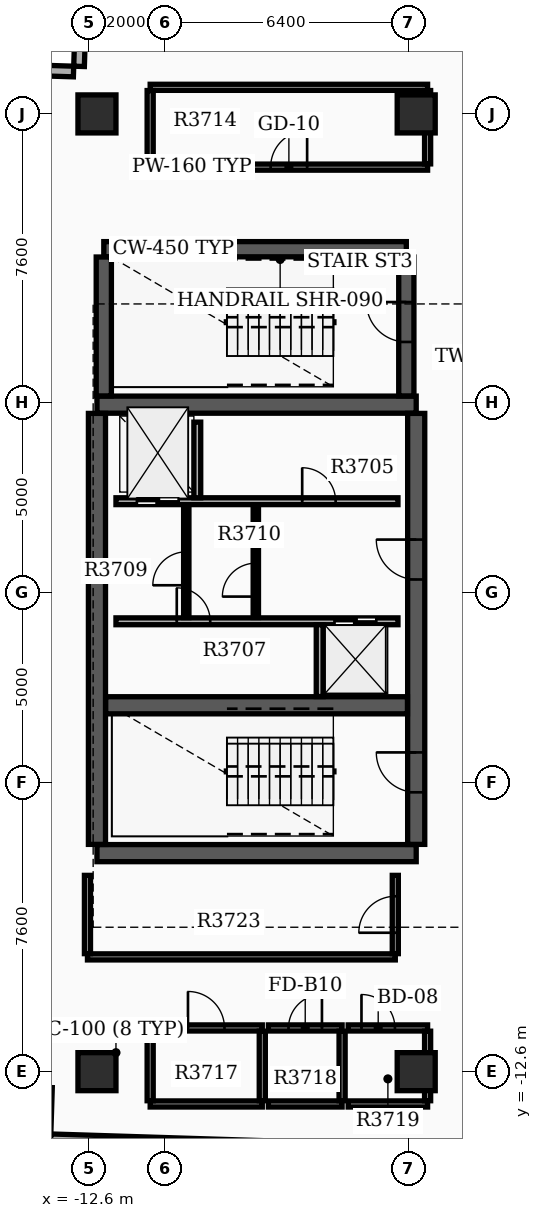
"""IFC4 building model, lengths in metres.
Left out: names, types, materials, properties, quantities, classifications, styles, units other than length and angle.
Written with IfcOpenShell. Run it as: python <this file> out.ifc"""

import sys

from ifc_helpers import new_model, si_unit, direction, frame, frame_2d, origin, origin_2d, place, context, subcontext, project, spatial, rectangle, extrude, element, fill, save


model = new_model("IFC4")
c1 = context("Model", 3, precision=1e-05, world=origin(), true_north=direction((0.0, 1.0)))
c2 = subcontext(c1, "Body", "Model", "MODEL_VIEW")
j1 = project(units=[si_unit("LENGTHUNIT", "METRE"), si_unit("PLANEANGLEUNIT", "RADIAN")], contexts=[c1])
p1 = place(None, origin())
s1 = spatial("IfcSite", under=j1, at=p1, CompositionType="ELEMENT")
p2 = place(p1, origin())
s2 = spatial("IfcBuilding", under=s1, at=p2, CompositionType="ELEMENT")
p3 = place(p2, frame((0.0, 0.0, 232.5)))
s3 = spatial("IfcBuildingStorey", under=s2, at=p3, CompositionType="ELEMENT", Elevation=232.5)
for number, where, z_axis, x_axis in (
    (1, (-12.4, -6.85, 0.0), (0.0, 0.0, 1.0), (1.0, 0.0, 0.0)),
    (2, (-12.4, 4.95, 0.0), (0.0, 0.0, 1.0), (1.0, 0.0, 0.0)),
):
    element("IfcWall", number, at=place(p3, frame(where, z_axis=z_axis, x_axis=x_axis)), inside=s3, PredefinedType="SHEAR", context=c2, shape_type="SweptSolid", body=[
        extrude(rectangle(XDim=8.4, YDim=0.45, at=frame_2d((4.2, 0.0))), origin(), (0.0, 0.0, 1.0), 3.7),
    ])
p4 = place(p3, frame((-12.4, -6.62, 0.0), z_axis=(0.0, 0.0, 1.0), x_axis=(0.0, 1.0, 0.0)))
e3 = element("IfcWall", 3, at=p4, inside=s3, PredefinedType="SHEAR", context=c2, shape_type="SweptSolid", body=[
    extrude(rectangle(XDim=11.34, YDim=0.45, at=frame_2d((5.67, 0.0))), origin(), (0.0, 0.0, 1.0), 3.7),
])
p5 = place(p3, frame((-4.0, -6.62, 0.0), z_axis=(0.0, 0.0, 1.0), x_axis=(0.0, 1.0, 0.0)))
e4 = element("IfcWall", 4, at=p5, inside=s3, PredefinedType="SHEAR", context=c2, shape_type="SweptSolid", body=[
    extrude(rectangle(XDim=11.34, YDim=0.45, at=frame_2d((5.67, 0.0))), origin(), (0.0, 0.0, 1.0), 3.7),
])
p6 = place(p5, frame((1.37, 0.0, 0.0)))
e5 = element("IfcOpeningElement", 5, at=p6, cuts=e4, PredefinedType="OPENING", context=c2, shape_type="SweptSolid", body=[
    extrude(rectangle(XDim=1.05, YDim=2.15, at=frame_2d((0.525, 1.075))), frame((0.0, 0.235, 0.0), z_axis=(0.0, -1.0, 0.0), x_axis=(1.0, 0.0, 0.0)), (0.0, 0.0, 1.0), 0.47),
])
p7 = place(p5, frame((6.97, 0.0, 0.0)))
e6 = element("IfcOpeningElement", 6, at=p7, cuts=e4, PredefinedType="OPENING", context=c2, shape_type="SweptSolid", body=[
    extrude(rectangle(XDim=1.05, YDim=2.15, at=frame_2d((0.525, 1.075))), frame((0.0, 0.235, 0.0), z_axis=(0.0, -1.0, 0.0), x_axis=(1.0, 0.0, 0.0)), (0.0, 0.0, 1.0), 0.47),
])
p8 = place(p3, frame((-12.17, -2.96, 0.0), z_axis=(0.0, 0.0, 1.0), x_axis=(1.0, 0.0, 0.0)))
e7 = element("IfcWall", 7, at=p8, inside=s3, PredefinedType="SHEAR", context=c2, shape_type="SweptSolid", body=[
    extrude(rectangle(XDim=7.94, YDim=0.45, at=frame_2d((3.97, 0.0))), origin(), (0.0, 0.0, 1.0), 3.7),
])
p9 = place(p3, frame((-12.22, 9.04, 0.0), z_axis=(0.0, 0.0, 1.0), x_axis=(1.0, 0.0, 0.0)))
e8 = element("IfcWall", 8, at=p9, inside=s3, PredefinedType="SHEAR", context=c2, shape_type="SweptSolid", body=[
    extrude(rectangle(XDim=7.96, YDim=0.4, at=frame_2d((3.98, 0.0))), origin(), (0.0, 0.0, 1.0), 3.7),
])
p10 = place(p3, frame((-12.22, 5.18, 0.0), z_axis=(0.0, 0.0, 1.0), x_axis=(0.0, 1.0, 0.0)))
e9 = element("IfcWall", 9, at=p10, inside=s3, PredefinedType="SHEAR", context=c2, shape_type="SweptSolid", body=[
    extrude(rectangle(XDim=3.655, YDim=0.4, at=frame_2d((1.828, 0.0))), origin(), (0.0, 0.0, 1.0), 3.7),
])
p11 = place(p3, frame((-4.26, 5.18, 0.0), z_axis=(0.0, 0.0, 1.0), x_axis=(0.0, 1.0, 0.0)))
e10 = element("IfcWall", 10, at=p11, inside=s3, PredefinedType="SHEAR", context=c2, shape_type="SweptSolid", body=[
    extrude(rectangle(XDim=3.655, YDim=0.4, at=frame_2d((1.828, 0.0))), origin(), (0.0, 0.0, 1.0), 3.7),
])
p12 = place(p11, frame((1.42, 0.0, 0.0)))
e11 = element("IfcOpeningElement", 11, at=p12, cuts=e10, PredefinedType="OPENING", context=c2, shape_type="SweptSolid", body=[
    extrude(rectangle(XDim=1.05, YDim=2.15, at=frame_2d((0.525, 1.075))), frame((0.0, 0.21, 0.0), z_axis=(0.0, -1.0, 0.0), x_axis=(1.0, 0.0, 0.0)), (0.0, 0.0, 1.0), 0.42),
])
for number, where, z_axis, x_axis in (
    (12, (-12.4, -12.6, 0.0), (0.0, 0.0, 1.0), (1.0, 0.0, 0.0)),
    (13, (-12.4, 12.6, 0.0), (0.0, 0.0, 1.0), (1.0, 0.0, 0.0)),
    (14, (-4.0, -12.6, 0.0), (0.0, 0.0, 1.0), (1.0, 0.0, 0.0)),
    (15, (-4.0, 12.6, 0.0), (0.0, 0.0, 1.0), (1.0, 0.0, 0.0)),
):
    element("IfcColumn", number, at=place(p3, frame(where, z_axis=z_axis, x_axis=x_axis)), inside=s3, PredefinedType="COLUMN", context=c2, shape_type="SweptSolid", body=[
        extrude(rectangle(XDim=1.0, YDim=1.0, at=origin_2d()), origin(), (0.0, 0.0, 1.0), 3.9),
    ])
p13 = place(p3, frame((-14.235, 13.754, 0.0), z_axis=(0.0, 0.0, 1.0), x_axis=(0.999506398264, -0.031415916822, 0.0)))
e16 = element("IfcWall", 16, at=p13, inside=s3, PredefinedType="STANDARD", context=c2, shape_type="SweptSolid", body=[
    extrude(rectangle(XDim=1.22, YDim=0.28, at=frame_2d((0.61, 0.0))), origin(), (0.0, 0.0, 1.0), 3.18),
])
p14 = place(p3, frame((-12.871, 13.851, 0.0), z_axis=(0.0, 0.0, 1.0), x_axis=(0.031412596484, 0.999506502621, 0.0)))
e17 = element("IfcWall", 17, at=p14, inside=s3, PredefinedType="STANDARD", context=c2, shape_type="SweptSolid", body=[
    extrude(rectangle(XDim=1.5, YDim=0.28, at=frame_2d((0.75, 0.0))), origin(), (0.0, 0.0, 1.0), 3.18),
])
p15 = place(p3, frame((-13.618, -14.379, 0.0), z_axis=(0.0, 0.0, 1.0), x_axis=(0.999507224741, -0.031389611199, 0.0)))
e18 = element("IfcWall", 18, at=p15, inside=s3, PredefinedType="STANDARD", context=c2, shape_type="SweptSolid", body=[
    extrude(rectangle(XDim=6.3, YDim=0.28, at=frame_2d((3.15, 0.0))), origin(), (0.0, 0.0, 1.0), 3.18),
])
p16 = place(p3, frame((-11.9, 2.41, 0.0), z_axis=(0.0, 0.0, 1.0), x_axis=(1.0, 0.0, 0.0)))
e19 = element("IfcWall", 19, at=p16, inside=s3, PredefinedType="SOLIDWALL", context=c2, shape_type="SweptSolid", body=[
    extrude(rectangle(XDim=7.42, YDim=0.18, at=frame_2d((3.71, 0.0))), origin(), (0.0, 0.0, 1.0), 3.17),
])
p17 = place(p16, frame((0.55, 0.0, 0.0)))
e20 = element("IfcOpeningElement", 20, at=p17, cuts=e19, PredefinedType="OPENING", context=c2, shape_type="SweptSolid", body=[
    extrude(rectangle(XDim=1.1, YDim=2.15, at=frame_2d((0.55, 1.075))), frame((0.0, 0.1, 0.0), z_axis=(0.0, -1.0, 0.0), x_axis=(1.0, 0.0, 0.0)), (0.0, 0.0, 1.0), 0.2),
])
p18 = place(p16, frame((4.9, 0.0, 0.0)))
e21 = element("IfcOpeningElement", 21, at=p18, cuts=e19, PredefinedType="OPENING", context=c2, shape_type="SweptSolid", body=[
    extrude(rectangle(XDim=0.88, YDim=2.1, at=frame_2d((0.44, 1.05))), frame((0.0, 0.1, 0.0), z_axis=(0.0, -1.0, 0.0), x_axis=(1.0, 0.0, 0.0)), (0.0, 0.0, 1.0), 0.2),
])
p19 = place(p3, frame((-11.9, -0.75, 0.0), z_axis=(0.0, 0.0, 1.0), x_axis=(1.0, 0.0, 0.0)))
e22 = element("IfcWall", 22, at=p19, inside=s3, PredefinedType="SOLIDWALL", context=c2, shape_type="SweptSolid", body=[
    extrude(rectangle(XDim=7.42, YDim=0.18, at=frame_2d((3.71, 0.0))), origin(), (0.0, 0.0, 1.0), 3.17),
])
p20 = place(p19, frame((5.75, 0.0, 0.0)))
e23 = element("IfcOpeningElement", 23, at=p20, cuts=e22, PredefinedType="OPENING", context=c2, shape_type="SweptSolid", body=[
    extrude(rectangle(XDim=1.1, YDim=2.15, at=frame_2d((0.55, 1.075))), frame((0.0, 0.1, 0.0), z_axis=(0.0, -1.0, 0.0), x_axis=(1.0, 0.0, 0.0)), (0.0, 0.0, 1.0), 0.2),
])
p21 = place(p19, frame((1.6, 0.0, 0.0)))
e24 = element("IfcOpeningElement", 24, at=p21, cuts=e22, PredefinedType="OPENING", context=c2, shape_type="SweptSolid", body=[
    extrude(rectangle(XDim=0.88, YDim=2.1, at=frame_2d((0.44, 1.05))), frame((0.0, 0.1, 0.0), z_axis=(0.0, -1.0, 0.0), x_axis=(1.0, 0.0, 0.0)), (0.0, 0.0, 1.0), 0.2),
])
p22 = place(p3, frame((-9.76, 2.5, 0.0), z_axis=(0.0, 0.0, 1.0), x_axis=(0.0, 1.0, 0.0)))
e25 = element("IfcWall", 25, at=p22, inside=s3, PredefinedType="SOLIDWALL", context=c2, shape_type="SweptSolid", body=[
    extrude(rectangle(XDim=1.99, YDim=0.18, at=frame_2d((0.995, 0.0))), origin(), (0.0, 0.0, 1.0), 3.17),
])
p23 = place(p3, frame((-6.54, -2.73, 0.0), z_axis=(0.0, 0.0, 1.0), x_axis=(0.0, 1.0, 0.0)))
e26 = element("IfcWall", 26, at=p23, inside=s3, PredefinedType="SOLIDWALL", context=c2, shape_type="SweptSolid", body=[
    extrude(rectangle(XDim=1.89, YDim=0.18, at=frame_2d((0.945, 0.0))), origin(), (0.0, 0.0, 1.0), 3.17),
])
p24 = place(p3, frame((-8.22, -0.65, 0.0), z_axis=(0.0, 0.0, 1.0), x_axis=(0.0, 1.0, 0.0)))
e27 = element("IfcWall", 27, at=p24, inside=s3, PredefinedType="SOLIDWALL", context=c2, shape_type="SweptSolid", body=[
    extrude(rectangle(XDim=2.96, YDim=0.14, at=frame_2d((1.48, 0.0))), origin(), (0.0, 0.0, 1.0), 3.17),
])
p25 = place(p24, frame((0.55, 0.0, 0.0)))
e28 = element("IfcOpeningElement", 28, at=p25, cuts=e27, PredefinedType="OPENING", context=c2, shape_type="SweptSolid", body=[
    extrude(rectangle(XDim=0.88, YDim=2.1, at=frame_2d((0.44, 1.05))), frame((0.0, 0.08, 0.0), z_axis=(0.0, -1.0, 0.0), x_axis=(1.0, 0.0, 0.0)), (0.0, 0.0, 1.0), 0.16),
])
p26 = place(p3, frame((-10.05, -0.652, 0.0), z_axis=(0.0, 0.0, 1.0), x_axis=(0.0, 1.0, 0.0)))
e29 = element("IfcWall", 29, at=p26, inside=s3, PredefinedType="PARTITIONING", context=c2, shape_type="SweptSolid", body=[
    extrude(rectangle(XDim=2.962, YDim=0.14, at=frame_2d((1.481, 0.0))), origin(), (0.0, 0.0, 1.0), 3.17),
])
p27 = place(p26, frame((0.85, 0.0, 0.0)))
e30 = element("IfcOpeningElement", 30, at=p27, cuts=e29, PredefinedType="OPENING", context=c2, shape_type="SweptSolid", body=[
    extrude(rectangle(XDim=0.88, YDim=2.1, at=frame_2d((0.44, 1.05))), frame((0.0, 0.08, 0.0), z_axis=(0.0, -1.0, 0.0), x_axis=(1.0, 0.0, 0.0)), (0.0, 0.0, 1.0), 0.16),
])
p28 = place(p3, frame((-11.0, 11.2, 0.0), z_axis=(0.0, 0.0, 1.0), x_axis=(1.0, 0.0, 0.0)))
e31 = element("IfcWall", 31, at=p28, inside=s3, PredefinedType="PARTITIONING", context=c2, shape_type="SweptSolid", body=[
    extrude(rectangle(XDim=7.3, YDim=0.16, at=frame_2d((3.65, 0.0))), origin(), (0.0, 0.0, 1.0), 3.17),
])
p29 = place(p28, frame((3.17, 0.0, 0.0)))
e32 = element("IfcOpeningElement", 32, at=p29, cuts=e31, PredefinedType="OPENING", context=c2, shape_type="SweptSolid", body=[
    extrude(rectangle(XDim=0.96, YDim=2.15, at=frame_2d((0.48, 1.075))), frame((0.0, 0.09, 0.0), z_axis=(0.0, -1.0, 0.0), x_axis=(1.0, 0.0, 0.0)), (0.0, 0.0, 1.0), 0.18),
])
p30 = place(p3, frame((-11.0, 13.3, 0.0), z_axis=(0.0, 0.0, 1.0), x_axis=(1.0, 0.0, 0.0)))
e33 = element("IfcWall", 33, at=p30, inside=s3, PredefinedType="PARTITIONING", context=c2, shape_type="SweptSolid", body=[
    extrude(rectangle(XDim=7.3, YDim=0.16, at=frame_2d((3.65, 0.0))), origin(), (0.0, 0.0, 1.0), 3.17),
])
for number, where, z_axis, x_axis in (
    (34, (-11.0, 11.285, 0.0), (0.0, 0.0, 1.0), (0.0, 1.0, 0.0)),
    (35, (-3.7, 11.285, 0.0), (0.0, 0.0, 1.0), (0.0, 1.0, 0.0)),
):
    element("IfcWall", number, at=place(p3, frame(where, z_axis=z_axis, x_axis=x_axis)), inside=s3, PredefinedType="PARTITIONING", context=c2, shape_type="SweptSolid", body=[
        extrude(rectangle(XDim=1.93, YDim=0.16, at=frame_2d((0.965, 0.0))), origin(), (0.0, 0.0, 1.0), 3.17),
    ])
p31 = place(p3, frame((-11.0, -13.45, 0.0), z_axis=(0.0, 0.0, 1.0), x_axis=(1.0, 0.0, 0.0)))
e36 = element("IfcWall", 36, at=p31, inside=s3, PredefinedType="PARTITIONING", context=c2, shape_type="SweptSolid", body=[
    extrude(rectangle(XDim=2.95, YDim=0.16, at=frame_2d((1.475, 0.0))), origin(), (0.0, 0.0, 1.0), 3.17),
])
p32 = place(p3, frame((-11.0, -11.45, 0.0), z_axis=(0.0, 0.0, 1.0), x_axis=(1.0, 0.0, 0.0)))
e37 = element("IfcWall", 37, at=p32, inside=s3, PredefinedType="PARTITIONING", context=c2, shape_type="SweptSolid", body=[
    extrude(rectangle(XDim=2.95, YDim=0.16, at=frame_2d((1.475, 0.0))), origin(), (0.0, 0.0, 1.0), 3.17),
])
p33 = place(p32, frame((0.995, 0.0, 0.0)))
e38 = element("IfcOpeningElement", 38, at=p33, cuts=e37, PredefinedType="OPENING", context=c2, shape_type="SweptSolid", body=[
    extrude(rectangle(XDim=0.96, YDim=2.15, at=frame_2d((0.48, 1.075))), frame((0.0, 0.09, 0.0), z_axis=(0.0, -1.0, 0.0), x_axis=(1.0, 0.0, 0.0)), (0.0, 0.0, 1.0), 0.18),
])
for number, where, z_axis, x_axis in (
    (39, (-11.0, -13.365, 0.0), (0.0, 0.0, 1.0), (0.0, 1.0, 0.0)),
    (40, (-8.05, -13.365, 0.0), (0.0, 0.0, 1.0), (0.0, 1.0, 0.0)),
):
    element("IfcWall", number, at=place(p3, frame(where, z_axis=z_axis, x_axis=x_axis)), inside=s3, PredefinedType="PARTITIONING", context=c2, shape_type="SweptSolid", body=[
        extrude(rectangle(XDim=1.83, YDim=0.16, at=frame_2d((0.915, 0.0))), origin(), (0.0, 0.0, 1.0), 3.17),
    ])
p34 = place(p3, frame((-7.89, -13.45, 0.0), z_axis=(0.0, 0.0, 1.0), x_axis=(1.0, 0.0, 0.0)))
e41 = element("IfcWall", 41, at=p34, inside=s3, PredefinedType="PARTITIONING", context=c2, shape_type="SweptSolid", body=[
    extrude(rectangle(XDim=1.94, YDim=0.16, at=frame_2d((0.97, 0.0))), origin(), (0.0, 0.0, 1.0), 3.17),
])
p35 = place(p3, frame((-7.89, -11.45, 0.0), z_axis=(0.0, 0.0, 1.0), x_axis=(1.0, 0.0, 0.0)))
e42 = element("IfcWall", 42, at=p35, inside=s3, PredefinedType="PARTITIONING", context=c2, shape_type="SweptSolid", body=[
    extrude(rectangle(XDim=1.94, YDim=0.16, at=frame_2d((0.97, 0.0))), origin(), (0.0, 0.0, 1.0), 3.17),
])
p36 = place(p35, frame((0.53, 0.0, 0.0)))
e43 = element("IfcOpeningElement", 43, at=p36, cuts=e42, PredefinedType="OPENING", context=c2, shape_type="SweptSolid", body=[
    extrude(rectangle(XDim=0.88, YDim=2.1, at=frame_2d((0.44, 1.05))), frame((0.0, 0.09, 0.0), z_axis=(0.0, -1.0, 0.0), x_axis=(1.0, 0.0, 0.0)), (0.0, 0.0, 1.0), 0.18),
])
p37 = place(p3, frame((-5.95, -13.365, 0.0), z_axis=(0.0, 0.0, 1.0), x_axis=(0.0, 1.0, 0.0)))
e44 = element("IfcWall", 44, at=p37, inside=s3, PredefinedType="PARTITIONING", context=c2, shape_type="SweptSolid", body=[
    extrude(rectangle(XDim=1.83, YDim=0.16, at=frame_2d((0.915, 0.0))), origin(), (0.0, 0.0, 1.0), 3.17),
])
p38 = place(p3, frame((-5.79, -13.45, 0.0), z_axis=(0.0, 0.0, 1.0), x_axis=(1.0, 0.0, 0.0)))
e45 = element("IfcWall", 45, at=p38, inside=s3, PredefinedType="PARTITIONING", context=c2, shape_type="SweptSolid", body=[
    extrude(rectangle(XDim=2.09, YDim=0.16, at=frame_2d((1.045, 0.0))), origin(), (0.0, 0.0, 1.0), 3.17),
])
p39 = place(p3, frame((-5.79, -11.45, 0.0), z_axis=(0.0, 0.0, 1.0), x_axis=(1.0, 0.0, 0.0)))
e46 = element("IfcWall", 46, at=p39, inside=s3, PredefinedType="PARTITIONING", context=c2, shape_type="SweptSolid", body=[
    extrude(rectangle(XDim=2.09, YDim=0.16, at=frame_2d((1.045, 0.0))), origin(), (0.0, 0.0, 1.0), 3.17),
])
p40 = place(p39, frame((0.35, 0.0, 0.0)))
e47 = element("IfcOpeningElement", 47, at=p40, cuts=e46, PredefinedType="OPENING", context=c2, shape_type="SweptSolid", body=[
    extrude(rectangle(XDim=0.88, YDim=2.15, at=frame_2d((0.44, 1.075))), frame((0.0, 0.09, 0.0), z_axis=(0.0, -1.0, 0.0), x_axis=(1.0, 0.0, 0.0)), (0.0, 0.0, 1.0), 0.18),
])
p41 = place(p3, frame((-3.7, -13.365, 0.0), z_axis=(0.0, 0.0, 1.0), x_axis=(0.0, 1.0, 0.0)))
e48 = element("IfcWall", 48, at=p41, inside=s3, PredefinedType="PARTITIONING", context=c2, shape_type="SweptSolid", body=[
    extrude(rectangle(XDim=1.83, YDim=0.16, at=frame_2d((0.915, 0.0))), origin(), (0.0, 0.0, 1.0), 3.17),
])
p42 = place(p3, frame((-12.65, -9.58, 0.0), z_axis=(0.0, 0.0, 1.0), x_axis=(1.0, 0.0, 0.0)))
e49 = element("IfcWall", 49, at=p42, inside=s3, PredefinedType="PARTITIONING", context=c2, shape_type="SweptSolid", body=[
    extrude(rectangle(XDim=8.1, YDim=0.16, at=frame_2d((4.05, 0.0))), origin(), (0.0, 0.0, 1.0), 3.17),
])
p43 = place(p3, frame((-12.65, -9.495, 0.0), z_axis=(0.0, 0.0, 1.0), x_axis=(0.0, 1.0, 0.0)))
e50 = element("IfcWall", 50, at=p43, inside=s3, PredefinedType="PARTITIONING", context=c2, shape_type="SweptSolid", body=[
    extrude(rectangle(XDim=2.06, YDim=0.16, at=frame_2d((1.03, 0.0))), origin(), (0.0, 0.0, 1.0), 3.17),
])
p44 = place(p3, frame((-4.55, -9.495, 0.0), z_axis=(0.0, 0.0, 1.0), x_axis=(0.0, 1.0, 0.0)))
e51 = element("IfcWall", 51, at=p44, inside=s3, PredefinedType="PARTITIONING", context=c2, shape_type="SweptSolid", body=[
    extrude(rectangle(XDim=2.06, YDim=0.16, at=frame_2d((1.03, 0.0))), origin(), (0.0, 0.0, 1.0), 3.17),
])
p45 = place(p44, frame((0.55, 0.0, 0.0)))
e52 = element("IfcOpeningElement", 52, at=p45, cuts=e51, PredefinedType="OPENING", context=c2, shape_type="SweptSolid", body=[
    extrude(rectangle(XDim=0.96, YDim=2.15, at=frame_2d((0.48, 1.075))), frame((0.0, 0.09, 0.0), z_axis=(0.0, -1.0, 0.0), x_axis=(1.0, 0.0, 0.0)), (0.0, 0.0, 1.0), 0.18),
])
p46 = place(p6, origin())
e53 = element("IfcDoor", 53, at=p46, inside=s3, OperationType="SINGLE_SWING_RIGHT", PredefinedType="DOOR", context=c2, shape_type="SweptSolid", body=[
    extrude(rectangle(XDim=1.05, YDim=2.15, at=frame_2d((0.525, 1.075))), frame((0.0, 0.025, 0.0), z_axis=(0.0, -1.0, 0.0), x_axis=(1.0, 0.0, 0.0)), (0.0, 0.0, 1.0), 0.05),
])
fill(e5, e53)
p47 = place(p7, origin())
e54 = element("IfcDoor", 54, at=p47, inside=s3, OperationType="SINGLE_SWING_RIGHT", PredefinedType="DOOR", context=c2, shape_type="SweptSolid", body=[
    extrude(rectangle(XDim=1.05, YDim=2.15, at=frame_2d((0.525, 1.075))), frame((0.0, 0.025, 0.0), z_axis=(0.0, -1.0, 0.0), x_axis=(1.0, 0.0, 0.0)), (0.0, 0.0, 1.0), 0.05),
])
fill(e6, e54)
p48 = place(p12, origin())
e55 = element("IfcDoor", 55, at=p48, inside=s3, OperationType="SINGLE_SWING_RIGHT", PredefinedType="DOOR", context=c2, shape_type="SweptSolid", body=[
    extrude(rectangle(XDim=1.05, YDim=2.15, at=frame_2d((0.525, 1.075))), frame((0.0, 0.025, 0.0), z_axis=(0.0, -1.0, 0.0), x_axis=(1.0, 0.0, 0.0)), (0.0, 0.0, 1.0), 0.05),
])
fill(e11, e55)
p49 = place(p17, origin())
e56 = element("IfcDoor", 56, at=p49, inside=s3, OperationType="DOUBLE_DOOR_SLIDING", PredefinedType="DOOR", context=c2, shape_type="SweptSolid", body=[
    extrude(rectangle(XDim=1.1, YDim=2.15, at=frame_2d((0.55, 1.075))), frame((0.0, 0.025, 0.0), z_axis=(0.0, -1.0, 0.0), x_axis=(1.0, 0.0, 0.0)), (0.0, 0.0, 1.0), 0.05),
])
fill(e20, e56)
p50 = place(p20, origin())
e57 = element("IfcDoor", 57, at=p50, inside=s3, OperationType="DOUBLE_DOOR_SLIDING", PredefinedType="DOOR", context=c2, shape_type="SweptSolid", body=[
    extrude(rectangle(XDim=1.1, YDim=2.15, at=frame_2d((0.55, 1.075))), frame((0.0, 0.025, 0.0), z_axis=(0.0, -1.0, 0.0), x_axis=(1.0, 0.0, 0.0)), (0.0, 0.0, 1.0), 0.05),
])
fill(e23, e57)
p51 = place(p18, origin())
e58 = element("IfcDoor", 58, at=p51, inside=s3, OperationType="SINGLE_SWING_LEFT", PredefinedType="DOOR", context=c2, shape_type="SweptSolid", body=[
    extrude(rectangle(XDim=0.88, YDim=2.1, at=frame_2d((0.44, 1.05))), frame((0.0, 0.025, 0.0), z_axis=(0.0, -1.0, 0.0), x_axis=(1.0, 0.0, 0.0)), (0.0, 0.0, 1.0), 0.05),
])
fill(e21, e58)
p52 = place(p21, origin())
e59 = element("IfcDoor", 59, at=p52, inside=s3, OperationType="SINGLE_SWING_LEFT", PredefinedType="DOOR", context=c2, shape_type="SweptSolid", body=[
    extrude(rectangle(XDim=0.88, YDim=2.1, at=frame_2d((0.44, 1.05))), frame((0.0, 0.025, 0.0), z_axis=(0.0, -1.0, 0.0), x_axis=(1.0, 0.0, 0.0)), (0.0, 0.0, 1.0), 0.05),
])
fill(e24, e59)
p53 = place(p25, origin())
e60 = element("IfcDoor", 60, at=p53, inside=s3, OperationType="SINGLE_SWING_LEFT", PredefinedType="DOOR", context=c2, shape_type="SweptSolid", body=[
    extrude(rectangle(XDim=0.88, YDim=2.1, at=frame_2d((0.44, 1.05))), frame((0.0, 0.025, 0.0), z_axis=(0.0, -1.0, 0.0), x_axis=(1.0, 0.0, 0.0)), (0.0, 0.0, 1.0), 0.05),
])
fill(e28, e60)
p54 = place(p27, origin())
e61 = element("IfcDoor", 61, at=p54, inside=s3, OperationType="SINGLE_SWING_LEFT", PredefinedType="DOOR", context=c2, shape_type="SweptSolid", body=[
    extrude(rectangle(XDim=0.88, YDim=2.1, at=frame_2d((0.44, 1.05))), frame((0.0, 0.025, 0.0), z_axis=(0.0, -1.0, 0.0), x_axis=(1.0, 0.0, 0.0)), (0.0, 0.0, 1.0), 0.05),
])
fill(e30, e61)
p55 = place(p29, origin())
e62 = element("IfcDoor", 62, at=p55, inside=s3, OperationType="SINGLE_SWING_RIGHT", PredefinedType="DOOR", context=c2, shape_type="SweptSolid", body=[
    extrude(rectangle(XDim=0.96, YDim=2.15, at=frame_2d((0.48, 1.075))), frame((0.0, 0.025, 0.0), z_axis=(0.0, -1.0, 0.0), x_axis=(1.0, 0.0, 0.0)), (0.0, 0.0, 1.0), 0.05),
])
fill(e32, e62)
p56 = place(p33, origin())
e63 = element("IfcDoor", 63, at=p56, inside=s3, OperationType="SINGLE_SWING_LEFT", PredefinedType="DOOR", context=c2, shape_type="SweptSolid", body=[
    extrude(rectangle(XDim=0.96, YDim=2.15, at=frame_2d((0.48, 1.075))), frame((0.0, 0.025, 0.0), z_axis=(0.0, -1.0, 0.0), x_axis=(1.0, 0.0, 0.0)), (0.0, 0.0, 1.0), 0.05),
])
fill(e38, e63)
p57 = place(p36, origin())
e64 = element("IfcDoor", 64, at=p57, inside=s3, OperationType="SINGLE_SWING_RIGHT", PredefinedType="DOOR", context=c2, shape_type="SweptSolid", body=[
    extrude(rectangle(XDim=0.88, YDim=2.1, at=frame_2d((0.44, 1.05))), frame((0.0, 0.025, 0.0), z_axis=(0.0, -1.0, 0.0), x_axis=(1.0, 0.0, 0.0)), (0.0, 0.0, 1.0), 0.05),
])
fill(e43, e64)
p58 = place(p40, origin())
e65 = element("IfcDoor", 65, at=p58, inside=s3, OperationType="SINGLE_SWING_LEFT", PredefinedType="DOOR", context=c2, shape_type="SweptSolid", body=[
    extrude(rectangle(XDim=0.88, YDim=2.15, at=frame_2d((0.44, 1.075))), frame((0.0, 0.025, 0.0), z_axis=(0.0, -1.0, 0.0), x_axis=(1.0, 0.0, 0.0)), (0.0, 0.0, 1.0), 0.05),
])
fill(e47, e65)
p59 = place(p45, origin())
e66 = element("IfcDoor", 66, at=p59, inside=s3, OperationType="SINGLE_SWING_LEFT", PredefinedType="DOOR", context=c2, shape_type="SweptSolid", body=[
    extrude(rectangle(XDim=0.96, YDim=2.15, at=frame_2d((0.48, 1.075))), frame((0.0, 0.025, 0.0), z_axis=(0.0, -1.0, 0.0), x_axis=(1.0, 0.0, 0.0)), (0.0, 0.0, 1.0), 0.05),
])
fill(e52, e66)
save(model, sys.argv[1])
